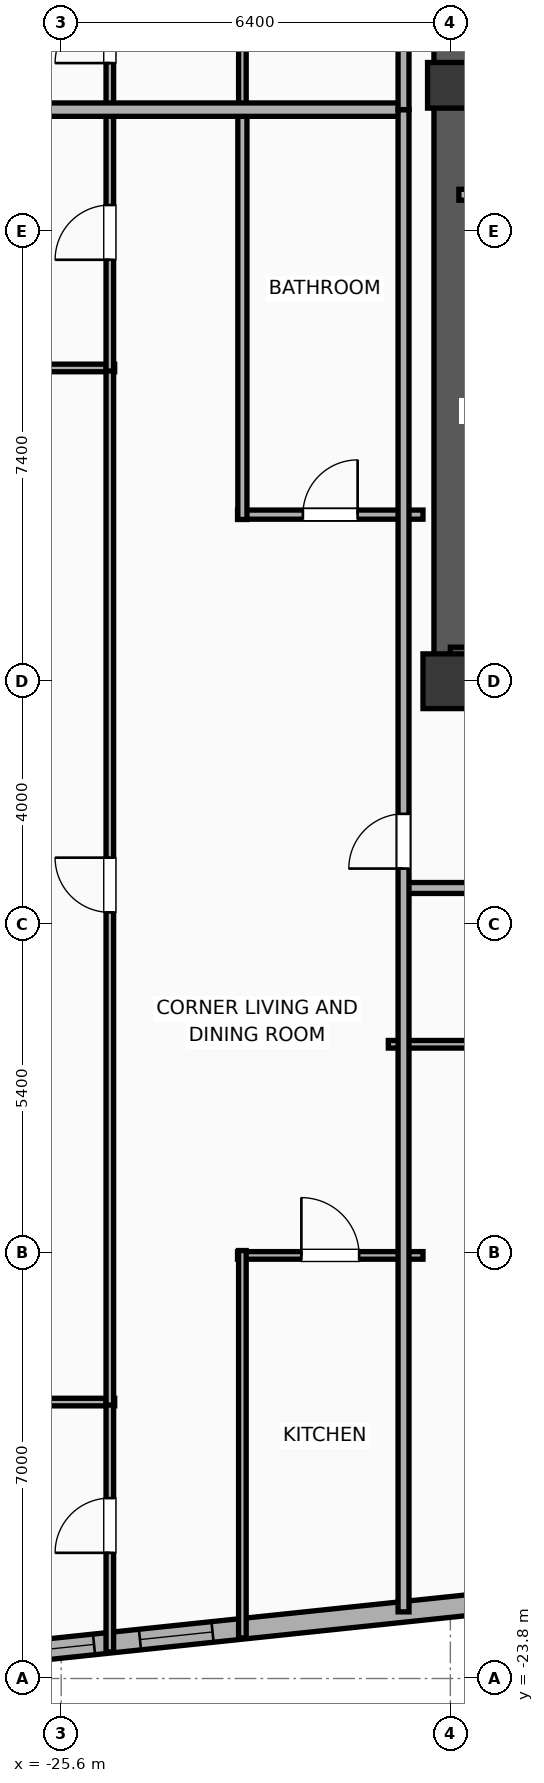
"""IFC4 building model, lengths in metres.
Left out: names, types, materials, properties, quantities, classifications, styles, units other than length and angle.
Written with IfcOpenShell. Run it as: python <this file> out.ifc"""

import sys

from ifc_helpers import new_model, si_unit, direction, frame, frame_2d, origin, origin_2d, place, context, subcontext, project, spatial, rectangle, extrude, element, fill, save


model = new_model("IFC4")
c1 = context("Model", 3, precision=1e-05, world=origin(), true_north=direction((0.0, 1.0)))
c2 = subcontext(c1, "Body", "Model", "MODEL_VIEW")
j1 = project(units=[si_unit("LENGTHUNIT", "METRE"), si_unit("PLANEANGLEUNIT", "RADIAN")], contexts=[c1])
p1 = place(None, origin())
s1 = spatial("IfcSite", under=j1, at=p1, CompositionType="ELEMENT")
p2 = place(p1, origin())
s2 = spatial("IfcBuilding", under=s1, at=p2, CompositionType="ELEMENT")
p3 = place(p2, frame((0.0, 0.0, 175.5)))
s3 = spatial("IfcBuildingStorey", under=s2, at=p3, CompositionType="ELEMENT", Elevation=175.5)
p4 = place(p3, frame((-19.2, -7.4, 0.0), z_axis=(0.0, 0.0, 1.0), x_axis=(1.0, 0.0, 0.0)))
e1 = element("IfcColumn", 1, at=p4, inside=s3, PredefinedType="COLUMN", context=c2, shape_type="SweptSolid", body=[
    extrude(rectangle(XDim=0.9, YDim=0.9, at=origin_2d()), origin(), (0.0, 0.0, 1.0), 3.9),
])
p5 = place(p3, frame((-19.2, 2.4, 0.0), z_axis=(0.0, 0.0, 1.0), x_axis=(1.0, 0.0, 0.0)))
e2 = element("IfcColumn", 2, at=p5, inside=s3, PredefinedType="COLUMN", context=c2, shape_type="SweptSolid", body=[
    extrude(rectangle(XDim=0.75, YDim=0.75, at=origin_2d()), origin(), (0.0, 0.0, 1.0), 3.9),
])
p6 = place(p3, frame((-19.425, -7.4, 0.0), z_axis=(0.0, 0.0, 1.0), x_axis=(1.0, 0.0, 0.0)))
e3 = element("IfcWall", 3, at=p6, inside=s3, PredefinedType="SHEAR", context=c2, shape_type="SweptSolid", body=[
    extrude(rectangle(XDim=7.25, YDim=0.45, at=frame_2d((3.625, 0.0))), origin(), (0.0, 0.0, 1.0), 3.65),
])
p7 = place(p3, frame((-19.145, -7.4, 0.0), z_axis=(0.0, 0.0, 1.0), x_axis=(0.0, 1.0, 0.0)))
e4 = element("IfcWall", 4, at=p7, inside=s3, PredefinedType="SHEAR", context=c2, shape_type="SweptSolid", body=[
    extrude(rectangle(XDim=14.8, YDim=0.65, at=frame_2d((7.4, 0.0))), origin(), (0.0, 0.0, 1.0), 3.65),
])
p8 = place(p3, frame((-19.2, -6.965, 0.0), z_axis=(0.0, 0.0, 1.0), x_axis=(1.0, 0.0, 0.0)))
e5 = element("IfcWall", 5, at=p8, inside=s3, PredefinedType="SOLIDWALL", context=c2, shape_type="SweptSolid", body=[
    extrude(rectangle(XDim=3.46, YDim=0.25, at=frame_2d((1.73, 0.0))), origin(), (0.0, 0.0, 1.0), 3.65),
])
p9 = place(p3, frame((24.756, -18.003, 0.0), z_axis=(0.0, 0.0, 1.0), x_axis=(-0.99452160744, -0.104531202687, 0.0)))
e6 = element("IfcWall", 6, at=p9, inside=s3, PredefinedType="ELEMENTEDWALL", context=c2, shape_type="SweptSolid", body=[
    extrude(rectangle(XDim=51.967, YDim=0.34, at=frame_2d((25.983, 0.0))), origin(), (0.0, 0.0, 1.0), 3.65),
])
p10 = place(p9, frame((25.633, 0.0, 0.75)))
e7 = element("IfcOpeningElement", 7, at=p10, cuts=e6, PredefinedType="OPENING", context=c2, shape_type="SweptSolid", body=[
    extrude(rectangle(XDim=2.4, YDim=2.1, at=frame_2d((1.2, 1.05))), frame((0.0, 0.18, 0.0), z_axis=(0.0, -1.0, 0.0), x_axis=(1.0, 0.0, 0.0)), (0.0, 0.0, 1.0), 0.36),
])
p11 = place(p9, frame((42.318, 0.0, 0.75)))
e8 = element("IfcOpeningElement", 8, at=p11, cuts=e6, PredefinedType="OPENING", context=c2, shape_type="SweptSolid", body=[
    extrude(rectangle(XDim=1.2, YDim=2.05, at=frame_2d((0.6, 1.025))), frame((0.0, 0.18, 0.0), z_axis=(0.0, -1.0, 0.0), x_axis=(1.0, 0.0, 0.0)), (0.0, 0.0, 1.0), 0.36),
])
p12 = place(p9, frame((34.121, 0.0, 0.75)))
e9 = element("IfcOpeningElement", 9, at=p12, cuts=e6, PredefinedType="OPENING", context=c2, shape_type="SweptSolid", body=[
    extrude(rectangle(XDim=1.2, YDim=2.05, at=frame_2d((0.6, 1.025))), frame((0.0, 0.18, 0.0), z_axis=(0.0, -1.0, 0.0), x_axis=(1.0, 0.0, 0.0)), (0.0, 0.0, 1.0), 0.36),
])
p13 = place(p9, frame((37.092, 0.0, 0.75)))
e10 = element("IfcOpeningElement", 10, at=p13, cuts=e6, PredefinedType="OPENING", context=c2, shape_type="SweptSolid", body=[
    extrude(rectangle(XDim=1.2, YDim=2.05, at=frame_2d((0.6, 1.025))), frame((0.0, 0.18, 0.0), z_axis=(0.0, -1.0, 0.0), x_axis=(1.0, 0.0, 0.0)), (0.0, 0.0, 1.0), 0.36),
])
p14 = place(p9, frame((14.359, 0.0, 0.75)))
e11 = element("IfcOpeningElement", 11, at=p14, cuts=e6, PredefinedType="OPENING", context=c2, shape_type="SweptSolid", body=[
    extrude(rectangle(XDim=1.2, YDim=2.05, at=frame_2d((0.6, 1.025))), frame((0.0, 0.18, 0.0), z_axis=(0.0, -1.0, 0.0), x_axis=(1.0, 0.0, 0.0)), (0.0, 0.0, 1.0), 0.36),
])
p15 = place(p9, frame((11.388, 0.0, 0.75)))
e12 = element("IfcOpeningElement", 12, at=p15, cuts=e6, PredefinedType="OPENING", context=c2, shape_type="SweptSolid", body=[
    extrude(rectangle(XDim=1.2, YDim=2.05, at=frame_2d((0.6, 1.025))), frame((0.0, 0.18, 0.0), z_axis=(0.0, -1.0, 0.0), x_axis=(1.0, 0.0, 0.0)), (0.0, 0.0, 1.0), 0.36),
])
p16 = place(p9, frame((8.332, 0.0, 0.75)))
e13 = element("IfcOpeningElement", 13, at=p16, cuts=e6, PredefinedType="OPENING", context=c2, shape_type="SweptSolid", body=[
    extrude(rectangle(XDim=1.2, YDim=2.05, at=frame_2d((0.6, 1.025))), frame((0.0, 0.18, 0.0), z_axis=(0.0, -1.0, 0.0), x_axis=(1.0, 0.0, 0.0)), (0.0, 0.0, 1.0), 0.36),
])
p17 = place(p9, frame((5.331, 0.0, 0.75)))
e14 = element("IfcOpeningElement", 14, at=p17, cuts=e6, PredefinedType="OPENING", context=c2, shape_type="SweptSolid", body=[
    extrude(rectangle(XDim=1.2, YDim=2.05, at=frame_2d((0.6, 1.025))), frame((0.0, 0.18, 0.0), z_axis=(0.0, -1.0, 0.0), x_axis=(1.0, 0.0, 0.0)), (0.0, 0.0, 1.0), 0.36),
])
p18 = place(p9, frame((29.313, 0.0, 0.75)))
e15 = element("IfcOpeningElement", 15, at=p18, cuts=e6, PredefinedType="OPENING", context=c2, shape_type="SweptSolid", body=[
    extrude(rectangle(XDim=1.2, YDim=2.05, at=frame_2d((0.6, 1.025))), frame((0.0, 0.18, 0.0), z_axis=(0.0, -1.0, 0.0), x_axis=(1.0, 0.0, 0.0)), (0.0, 0.0, 1.0), 0.36),
])
p19 = place(p9, frame((22.248, 0.0, 0.75)))
e16 = element("IfcOpeningElement", 16, at=p19, cuts=e6, PredefinedType="OPENING", context=c2, shape_type="SweptSolid", body=[
    extrude(rectangle(XDim=1.2, YDim=2.05, at=frame_2d((0.6, 1.025))), frame((0.0, 0.18, 0.0), z_axis=(0.0, -1.0, 0.0), x_axis=(1.0, 0.0, 0.0)), (0.0, 0.0, 1.0), 0.36),
])
p20 = place(p9, frame((18.186, 0.0, 0.75)))
e17 = element("IfcOpeningElement", 17, at=p20, cuts=e6, PredefinedType="OPENING", context=c2, shape_type="SweptSolid", body=[
    extrude(rectangle(XDim=1.2, YDim=2.05, at=frame_2d((0.6, 1.025))), frame((0.0, 0.18, 0.0), z_axis=(0.0, -1.0, 0.0), x_axis=(1.0, 0.0, 0.0)), (0.0, 0.0, 1.0), 0.36),
])
p21 = place(p9, frame((48.13, 0.0, 0.75)))
e18 = element("IfcOpeningElement", 18, at=p21, cuts=e6, PredefinedType="OPENING", context=c2, shape_type="SweptSolid", body=[
    extrude(rectangle(XDim=1.2, YDim=2.05, at=frame_2d((0.6, 1.025))), frame((0.0, 0.18, 0.0), z_axis=(0.0, -1.0, 0.0), x_axis=(1.0, 0.0, 0.0)), (0.0, 0.0, 1.0), 0.36),
])
p22 = place(p9, frame((50.09, 0.0, 0.75)))
e19 = element("IfcOpeningElement", 19, at=p22, cuts=e6, PredefinedType="OPENING", context=c2, shape_type="SweptSolid", body=[
    extrude(rectangle(XDim=1.2, YDim=2.05, at=frame_2d((0.6, 1.025))), frame((0.0, 0.18, 0.0), z_axis=(0.0, -1.0, 0.0), x_axis=(1.0, 0.0, 0.0)), (0.0, 0.0, 1.0), 0.36),
])
p23 = place(p9, frame((0.718, 0.0, 0.75)))
e20 = element("IfcOpeningElement", 20, at=p23, cuts=e6, PredefinedType="OPENING", context=c2, shape_type="SweptSolid", body=[
    extrude(rectangle(XDim=1.2, YDim=2.05, at=frame_2d((0.6, 1.025))), frame((0.0, 0.18, 0.0), z_axis=(0.0, -1.0, 0.0), x_axis=(1.0, 0.0, 0.0)), (0.0, 0.0, 1.0), 0.36),
])
p24 = place(p3, frame((-19.06, 0.6, 0.0), z_axis=(0.0, 0.0, 1.0), x_axis=(1.0, 0.0, 0.0)))
e21 = element("IfcWall", 21, at=p24, inside=s3, PredefinedType="PARTITIONING", context=c2, shape_type="SweptSolid", body=[
    extrude(rectangle(XDim=3.36, YDim=0.18, at=frame_2d((1.68, 0.0))), origin(), (0.0, 0.0, 1.0), 3.65),
])
p25 = place(p24, frame((1.155, 0.0, 0.0)))
e22 = element("IfcOpeningElement", 22, at=p25, cuts=e21, PredefinedType="OPENING", context=c2, shape_type="SweptSolid", body=[
    extrude(rectangle(XDim=1.05, YDim=2.05, at=frame_2d((0.525, 1.025))), frame((0.0, 0.1, 0.0), z_axis=(0.0, -1.0, 0.0), x_axis=(1.0, 0.0, 0.0)), (0.0, 0.0, 1.0), 0.2),
])
p26 = place(p3, frame((-20.22, -13.37, 0.0), z_axis=(0.0, 0.0, 1.0), x_axis=(1.0, 0.0, 0.0)))
e23 = element("IfcWall", 23, at=p26, inside=s3, PredefinedType="PARTITIONING", context=c2, shape_type="SweptSolid", body=[
    extrude(rectangle(XDim=2.63, YDim=0.125, at=frame_2d((1.315, 0.0))), origin(), (0.0, 0.0, 1.0), 3.65),
])
p27 = place(p3, frame((-20.0, -10.8, 0.0), z_axis=(0.0, 0.0, 1.0), x_axis=(1.0, 0.0, 0.0)))
e24 = element("IfcWall", 24, at=p27, inside=s3, PredefinedType="PARTITIONING", context=c2, shape_type="SweptSolid", body=[
    extrude(rectangle(XDim=11.92, YDim=0.18, at=frame_2d((5.96, 0.0))), origin(), (0.0, 0.0, 1.0), 3.65),
])
p28 = place(p27, frame((2.705, 0.0, 0.0)))
e25 = element("IfcOpeningElement", 25, at=p28, cuts=e24, PredefinedType="OPENING", context=c2, shape_type="SweptSolid", body=[
    extrude(rectangle(XDim=0.9, YDim=2.05, at=frame_2d((0.45, 1.025))), frame((0.0, 0.1, 0.0), z_axis=(0.0, -1.0, 0.0), x_axis=(1.0, 0.0, 0.0)), (0.0, 0.0, 1.0), 0.2),
])
p29 = place(p27, frame((9.618, 0.0, 0.0)))
e26 = element("IfcOpeningElement", 26, at=p29, cuts=e24, PredefinedType="OPENING", context=c2, shape_type="SweptSolid", body=[
    extrude(rectangle(XDim=1.15, YDim=2.05, at=frame_2d((0.575, 1.025))), frame((0.0, 0.1, 0.0), z_axis=(0.0, -1.0, 0.0), x_axis=(1.0, 0.0, 0.0)), (0.0, 0.0, 1.0), 0.2),
])
p30 = place(p3, frame((-31.183, -19.254, 0.0), z_axis=(0.0, 0.0, 1.0), x_axis=(1.0, 0.0, 0.0)))
e27 = element("IfcWall", 27, at=p30, inside=s3, PredefinedType="PARTITIONING", context=c2, shape_type="SweptSolid", body=[
    extrude(rectangle(XDim=6.463, YDim=0.125, at=frame_2d((3.232, 0.0))), origin(), (0.0, 0.0, 1.0), 3.65),
])
p31 = place(p3, frame((-32.971, -2.248, 0.0), z_axis=(0.0, 0.0, 1.0), x_axis=(1.0, 0.0, 0.0)))
e28 = element("IfcWall", 28, at=p31, inside=s3, PredefinedType="PARTITIONING", context=c2, shape_type="SweptSolid", body=[
    extrude(rectangle(XDim=8.251, YDim=0.125, at=frame_2d((4.125, 0.0))), origin(), (0.0, 0.0, 1.0), 3.65),
])
p32 = place(p3, frame((-24.8, -23.363, 0.0), z_axis=(0.0, 0.0, 1.0), x_axis=(0.0, 1.0, 0.0)))
e29 = element("IfcWall", 29, at=p32, inside=s3, PredefinedType="PARTITIONING", context=c2, shape_type="SweptSolid", body=[
    extrude(rectangle(XDim=4.158, YDim=0.125, at=frame_2d((2.079, 0.0))), origin(), (0.0, 0.0, 1.0), 3.65),
])
p33 = place(p32, frame((1.629, 0.0, 0.0)))
e30 = element("IfcOpeningElement", 30, at=p33, cuts=e29, PredefinedType="OPENING", context=c2, shape_type="SweptSolid", body=[
    extrude(rectangle(XDim=0.9, YDim=2.05, at=frame_2d((0.45, 1.025))), frame((0.0, 0.073, 0.0), z_axis=(0.0, -1.0, 0.0), x_axis=(1.0, 0.0, 0.0)), (0.0, 0.0, 1.0), 0.145),
])
p34 = place(p3, frame((-24.8, -19.304, 0.0), z_axis=(0.0, 0.0, 1.0), x_axis=(0.0, 1.0, 0.0)))
e31 = element("IfcWall", 31, at=p34, inside=s3, PredefinedType="PARTITIONING", context=c2, shape_type="SweptSolid", body=[
    extrude(rectangle(XDim=17.106, YDim=0.125, at=frame_2d((8.553, 0.0))), origin(), (0.0, 0.0, 1.0), 3.65),
])
p35 = place(p34, frame((8.103, 0.0, 0.0)))
e32 = element("IfcOpeningElement", 32, at=p35, cuts=e31, PredefinedType="OPENING", context=c2, shape_type="SweptSolid", body=[
    extrude(rectangle(XDim=0.9, YDim=2.05, at=frame_2d((0.45, 1.025))), frame((0.0, 0.073, 0.0), z_axis=(0.0, -1.0, 0.0), x_axis=(1.0, 0.0, 0.0)), (0.0, 0.0, 1.0), 0.145),
])
p36 = place(p3, frame((-24.8, -2.298, 0.0), z_axis=(0.0, 0.0, 1.0), x_axis=(0.0, 1.0, 0.0)))
e33 = element("IfcWall", 33, at=p36, inside=s3, PredefinedType="PARTITIONING", context=c2, shape_type="SweptSolid", body=[
    extrude(rectangle(XDim=4.361, YDim=0.125, at=frame_2d((2.18, 0.0))), origin(), (0.0, 0.0, 1.0), 3.65),
])
p37 = place(p36, frame((1.829, 0.0, 0.0)))
e34 = element("IfcOpeningElement", 34, at=p37, cuts=e33, PredefinedType="OPENING", context=c2, shape_type="SweptSolid", body=[
    extrude(rectangle(XDim=0.9, YDim=2.05, at=frame_2d((0.45, 1.025))), frame((0.0, 0.073, 0.0), z_axis=(0.0, -1.0, 0.0), x_axis=(1.0, 0.0, 0.0)), (0.0, 0.0, 1.0), 0.145),
])
p38 = place(p3, frame((-22.7, -16.842, 0.0), z_axis=(0.0, 0.0, 1.0), x_axis=(1.0, 0.0, 0.0)))
e35 = element("IfcWall", 35, at=p38, inside=s3, PredefinedType="PARTITIONING", context=c2, shape_type="SweptSolid", body=[
    extrude(rectangle(XDim=3.05, YDim=0.125, at=frame_2d((1.525, 0.0))), origin(), (0.0, 0.0, 1.0), 3.65),
])
p39 = place(p38, frame((1.05, 0.0, 0.0)))
e36 = element("IfcOpeningElement", 36, at=p39, cuts=e35, PredefinedType="OPENING", context=c2, shape_type="SweptSolid", body=[
    extrude(rectangle(XDim=0.95, YDim=2.05, at=frame_2d((0.475, 1.025))), frame((0.0, 0.073, 0.0), z_axis=(0.0, -1.0, 0.0), x_axis=(1.0, 0.0, 0.0)), (0.0, 0.0, 1.0), 0.145),
])
p40 = place(p3, frame((-22.7, -4.66, 0.0), z_axis=(0.0, 0.0, 1.0), x_axis=(1.0, 0.0, 0.0)))
e37 = element("IfcWall", 37, at=p40, inside=s3, PredefinedType="PLUMBINGWALL", context=c2, shape_type="SweptSolid", body=[
    extrude(rectangle(XDim=3.05, YDim=0.15, at=frame_2d((1.525, 0.0))), origin(), (0.0, 0.0, 1.0), 3.65),
])
p41 = place(p40, frame((1.075, 0.0, 0.0)))
e38 = element("IfcOpeningElement", 38, at=p41, cuts=e37, PredefinedType="OPENING", context=c2, shape_type="SweptSolid", body=[
    extrude(rectangle(XDim=0.9, YDim=2.05, at=frame_2d((0.45, 1.025))), frame((0.0, 0.085, 0.0), z_axis=(0.0, -1.0, 0.0), x_axis=(1.0, 0.0, 0.0)), (0.0, 0.0, 1.0), 0.17),
])
p42 = place(p3, frame((-22.62, -23.133, 0.0), z_axis=(0.0, 0.0, 1.0), x_axis=(0.0, 1.0, 0.0)))
e39 = element("IfcWall", 39, at=p42, inside=s3, PredefinedType="PARTITIONING", context=c2, shape_type="SweptSolid", body=[
    extrude(rectangle(XDim=6.371, YDim=0.125, at=frame_2d((3.186, 0.0))), origin(), (0.0, 0.0, 1.0), 3.65),
])
p43 = place(p3, frame((-22.62, -4.74, 0.0), z_axis=(0.0, 0.0, 1.0), x_axis=(0.0, 1.0, 0.0)))
e40 = element("IfcWall", 40, at=p43, inside=s3, PredefinedType="PLUMBINGWALL", context=c2, shape_type="SweptSolid", body=[
    extrude(rectangle(XDim=6.72, YDim=0.15, at=frame_2d((3.36, 0.0))), origin(), (0.0, 0.0, 1.0), 3.65),
])
p44 = place(p3, frame((-24.8, 1.938, 0.0), z_axis=(0.0, 0.0, 1.0), x_axis=(0.0, 1.0, 0.0)))
e41 = element("IfcWall", 41, at=p44, inside=s3, PredefinedType="PARTITIONING", context=c2, shape_type="SweptSolid", body=[
    extrude(rectangle(XDim=2.753, YDim=0.125, at=frame_2d((1.377, 0.0))), origin(), (0.0, 0.0, 1.0), 3.65),
])
p45 = place(p44, frame((0.828, 0.0, 0.0)))
e42 = element("IfcOpeningElement", 42, at=p45, cuts=e41, PredefinedType="OPENING", context=c2, shape_type="SweptSolid", body=[
    extrude(rectangle(XDim=0.9, YDim=2.05, at=frame_2d((0.45, 1.025))), frame((0.0, 0.073, 0.0), z_axis=(0.0, -1.0, 0.0), x_axis=(1.0, 0.0, 0.0)), (0.0, 0.0, 1.0), 0.145),
])
p46 = place(p3, frame((-22.62, 2.02, 0.0), z_axis=(0.0, 0.0, 1.0), x_axis=(0.0, 1.0, 0.0)))
e43 = element("IfcWall", 43, at=p46, inside=s3, PredefinedType="PARTITIONING", context=c2, shape_type="SweptSolid", body=[
    extrude(rectangle(XDim=6.172, YDim=0.125, at=frame_2d((3.086, 0.0))), origin(), (0.0, 0.0, 1.0), 3.65),
])
p47 = place(p3, frame((-19.97, 2.0, 0.0), z_axis=(0.0, 0.0, 1.0), x_axis=(-1.0, 0.0, 0.0)))
e44 = element("IfcWall", 44, at=p47, inside=s3, PredefinedType="PARTITIONING", context=c2, shape_type="SweptSolid", body=[
    extrude(rectangle(XDim=13.297, YDim=0.22, at=frame_2d((6.648, 0.0))), origin(), (0.0, 0.0, 1.0), 3.65),
])
p48 = place(p3, frame((-19.97, -22.704, 0.0), z_axis=(0.0, 0.0, 1.0), x_axis=(0.0, 1.0, 0.0)))
e45 = element("IfcWall", 45, at=p48, inside=s3, PredefinedType="PARTITIONING", context=c2, shape_type="SweptSolid", body=[
    extrude(rectangle(XDim=24.704, YDim=0.18, at=frame_2d((12.352, 0.0))), origin(), (0.0, 0.0, 1.0), 3.65),
])
p49 = place(p48, frame((12.223, 0.0, 0.0)))
e46 = element("IfcOpeningElement", 46, at=p49, cuts=e45, PredefinedType="OPENING", context=c2, shape_type="SweptSolid", body=[
    extrude(rectangle(XDim=0.9, YDim=2.05, at=frame_2d((0.45, 1.025))), frame((0.0, 0.1, 0.0), z_axis=(0.0, -1.0, 0.0), x_axis=(1.0, 0.0, 0.0)), (0.0, 0.0, 1.0), 0.2),
])
p50 = place(p3, frame((-19.97, 2.0, 0.0), z_axis=(0.0, 0.0, 1.0), x_axis=(0.0, 1.0, 0.0)))
e47 = element("IfcWall", 47, at=p50, inside=s3, PredefinedType="PARTITIONING", context=c2, shape_type="SweptSolid", body=[
    extrude(rectangle(XDim=15.979, YDim=0.18, at=frame_2d((7.989, 0.0))), origin(), (0.0, 0.0, 1.0), 3.04),
])
p51 = place(p50, frame((7.579, 0.0, 0.0)))
e48 = element("IfcOpeningElement", 48, at=p51, cuts=e47, PredefinedType="OPENING", context=c2, shape_type="SweptSolid", body=[
    extrude(rectangle(XDim=0.9, YDim=2.05, at=frame_2d((0.45, 1.025))), frame((0.0, 0.1, 0.0), z_axis=(0.0, -1.0, 0.0), x_axis=(1.0, 0.0, 0.0)), (0.0, 0.0, 1.0), 0.2),
])
p52 = place(p21, origin())
e49 = element("IfcWindow", 49, at=p52, inside=s3, PartitioningType="SINGLE_PANEL", PredefinedType="WINDOW", context=c2, shape_type="SweptSolid", body=[
    extrude(rectangle(XDim=1.2, YDim=2.05, at=frame_2d((0.6, 1.025))), frame((0.0, 0.03, 0.0), z_axis=(0.0, -1.0, 0.0), x_axis=(1.0, 0.0, 0.0)), (0.0, 0.0, 1.0), 0.06),
])
fill(e18, e49)
p53 = place(p22, origin())
e50 = element("IfcWindow", 50, at=p53, inside=s3, PartitioningType="SINGLE_PANEL", PredefinedType="WINDOW", context=c2, shape_type="SweptSolid", body=[
    extrude(rectangle(XDim=1.2, YDim=2.05, at=frame_2d((0.6, 1.025))), frame((0.0, 0.03, 0.0), z_axis=(0.0, -1.0, 0.0), x_axis=(1.0, 0.0, 0.0)), (0.0, 0.0, 1.0), 0.06),
])
fill(e19, e50)
p54 = place(p33, origin())
e51 = element("IfcDoor", 51, at=p54, inside=s3, OperationType="SINGLE_SWING_LEFT", PredefinedType="DOOR", context=c2, shape_type="SweptSolid", body=[
    extrude(rectangle(XDim=0.9, YDim=2.05, at=frame_2d((0.45, 1.025))), frame((0.0, 0.025, 0.0), z_axis=(0.0, -1.0, 0.0), x_axis=(1.0, 0.0, 0.0)), (0.0, 0.0, 1.0), 0.05),
])
fill(e30, e51)
p55 = place(p35, origin())
e52 = element("IfcDoor", 52, at=p55, inside=s3, OperationType="SINGLE_SWING_RIGHT", PredefinedType="DOOR", context=c2, shape_type="SweptSolid", body=[
    extrude(rectangle(XDim=0.9, YDim=2.05, at=frame_2d((0.45, 1.025))), frame((0.0, 0.025, 0.0), z_axis=(0.0, -1.0, 0.0), x_axis=(1.0, 0.0, 0.0)), (0.0, 0.0, 1.0), 0.05),
])
fill(e32, e52)
p56 = place(p37, origin())
e53 = element("IfcDoor", 53, at=p56, inside=s3, OperationType="SINGLE_SWING_LEFT", PredefinedType="DOOR", context=c2, shape_type="SweptSolid", body=[
    extrude(rectangle(XDim=0.9, YDim=2.05, at=frame_2d((0.45, 1.025))), frame((0.0, 0.025, 0.0), z_axis=(0.0, -1.0, 0.0), x_axis=(1.0, 0.0, 0.0)), (0.0, 0.0, 1.0), 0.05),
])
fill(e34, e53)
p57 = place(p39, origin())
e54 = element("IfcDoor", 54, at=p57, inside=s3, OperationType="SINGLE_SWING_LEFT", PredefinedType="DOOR", context=c2, shape_type="SweptSolid", body=[
    extrude(rectangle(XDim=0.95, YDim=2.05, at=frame_2d((0.475, 1.025))), frame((0.0, 0.025, 0.0), z_axis=(0.0, -1.0, 0.0), x_axis=(1.0, 0.0, 0.0)), (0.0, 0.0, 1.0), 0.05),
])
fill(e36, e54)
p58 = place(p41, origin())
e55 = element("IfcDoor", 55, at=p58, inside=s3, OperationType="SINGLE_SWING_RIGHT", PredefinedType="DOOR", context=c2, shape_type="SweptSolid", body=[
    extrude(rectangle(XDim=0.9, YDim=2.05, at=frame_2d((0.45, 1.025))), frame((0.0, 0.025, 0.0), z_axis=(0.0, -1.0, 0.0), x_axis=(1.0, 0.0, 0.0)), (0.0, 0.0, 1.0), 0.05),
])
fill(e38, e55)
p59 = place(p45, origin())
e56 = element("IfcDoor", 56, at=p59, inside=s3, OperationType="SINGLE_SWING_LEFT", PredefinedType="DOOR", context=c2, shape_type="SweptSolid", body=[
    extrude(rectangle(XDim=0.9, YDim=2.05, at=frame_2d((0.45, 1.025))), frame((0.0, 0.025, 0.0), z_axis=(0.0, -1.0, 0.0), x_axis=(1.0, 0.0, 0.0)), (0.0, 0.0, 1.0), 0.05),
])
fill(e42, e56)
p60 = place(p49, origin())
e57 = element("IfcDoor", 57, at=p60, inside=s3, OperationType="SINGLE_SWING_LEFT", PredefinedType="DOOR", context=c2, shape_type="SweptSolid", body=[
    extrude(rectangle(XDim=0.9, YDim=2.05, at=frame_2d((0.45, 1.025))), frame((0.0, 0.025, 0.0), z_axis=(0.0, -1.0, 0.0), x_axis=(1.0, 0.0, 0.0)), (0.0, 0.0, 1.0), 0.05),
])
fill(e46, e57)
save(model, sys.argv[1])
